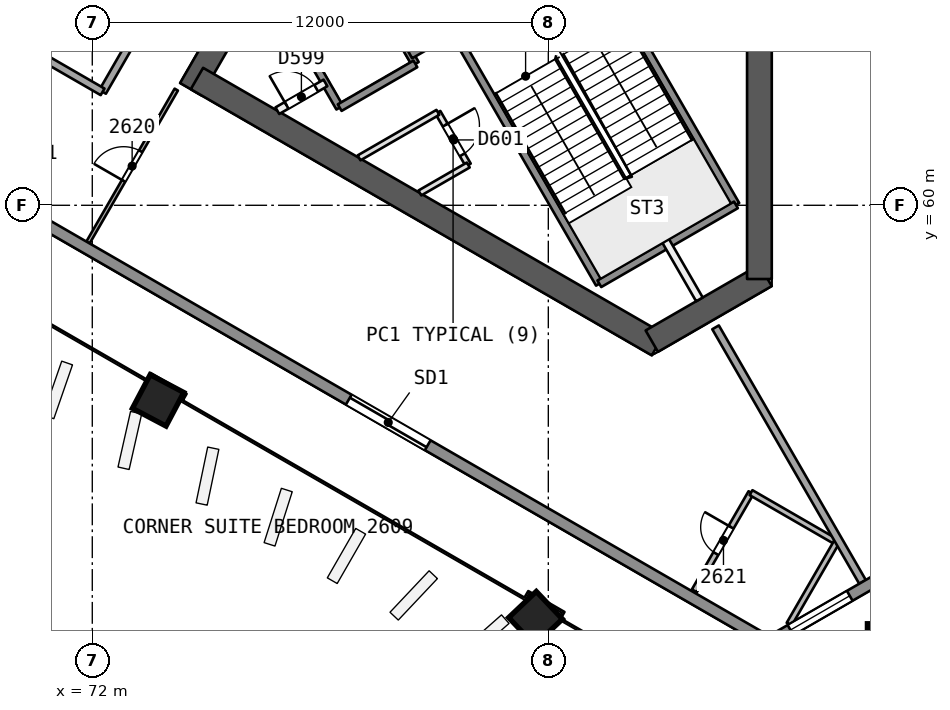
"""IFC4 building model, lengths in metres.
Left out: names, types, materials, properties, quantities, classifications, styles, units other than length and angle.
Written with IfcOpenShell. Run it as: python <this file> out.ifc"""

import sys

from ifc_helpers import new_model, si_unit, direction, frame, frame_2d, origin, origin_2d, place, context, subcontext, project, spatial, rectangle, extrude, element, fill, save


model = new_model("IFC4")
c1 = context("Model", 3, precision=1e-05, world=origin(), true_north=direction((0.0, 1.0)))
c2 = subcontext(c1, "Body", "Model", "MODEL_VIEW")
j1 = project(units=[si_unit("LENGTHUNIT", "METRE"), si_unit("PLANEANGLEUNIT", "RADIAN")], contexts=[c1])
p1 = place(None, origin())
s1 = spatial("IfcSite", under=j1, at=p1, CompositionType="ELEMENT")
p2 = place(p1, origin())
s2 = spatial("IfcBuilding", under=s1, at=p2, CompositionType="ELEMENT")
p3 = place(p2, frame((0.0, 0.0, 110.5)))
s3 = spatial("IfcBuildingStorey", under=s2, at=p3, CompositionType="ELEMENT", Elevation=110.5)
p4 = place(p3, frame((79.688, 71.881, 0.0), z_axis=(0.0, 0.0, 1.0), x_axis=(-0.49999822179, -0.866026430432, 0.0)))
e1 = element("IfcWall", 1, at=p4, inside=s3, PredefinedType="SHEAR", context=c2, shape_type="SweptSolid", body=[
    extrude(rectangle(XDim=10.192, YDim=0.65, at=frame_2d((5.096, 0.0))), origin(), (0.0, 0.0, 1.0), 3.7),
])
p5 = place(p4, frame((0.762, 0.0, 0.0)))
e2 = element("IfcOpeningElement", 2, at=p5, cuts=e1, PredefinedType="OPENING", context=c2, shape_type="SweptSolid", body=[
    extrude(rectangle(XDim=1.2, YDim=2.1, at=frame_2d((0.6, 1.05))), frame((0.0, 0.335, 0.0), z_axis=(0.0, -1.0, 0.0), x_axis=(1.0, 0.0, 0.0)), (0.0, 0.0, 1.0), 0.671),
])
p6 = place(p3, frame((74.754, 63.335, 0.0), z_axis=(0.0, 0.0, 1.0), x_axis=(0.866026250715, -0.49999853307, 0.0)))
e3 = element("IfcWall", 3, at=p6, inside=s3, PredefinedType="SHEAR", context=c2, shape_type="SweptSolid", body=[
    extrude(rectangle(XDim=14.008, YDim=0.65, at=frame_2d((7.004, 0.0))), origin(), (0.0, 0.0, 1.0), 3.7),
])
p7 = place(p3, frame((86.723, 56.425, 0.0), z_axis=(0.0, 0.0, 1.0), x_axis=(0.866031550877, 0.499989352773, 0.0)))
e4 = element("IfcWall", 4, at=p7, inside=s3, PredefinedType="SHEAR", context=c2, shape_type="SweptSolid", body=[
    extrude(rectangle(XDim=3.458, YDim=0.65, at=frame_2d((1.729, 0.0))), origin(), (0.0, 0.0, 1.0), 3.7),
])
p8 = place(p3, frame((89.555, 58.06, 0.0), z_axis=(0.0, 0.0, 1.0), x_axis=(0.0, 1.0, 0.0)))
e5 = element("IfcWall", 5, at=p8, inside=s3, PredefinedType="SHEAR", context=c2, shape_type="SweptSolid", body=[
    extrude(rectangle(XDim=14.146, YDim=0.65, at=frame_2d((7.073, 0.0))), origin(), (0.0, 0.0, 1.0), 3.7),
])
p9 = place(p3, frame((73.731, 54.839, 0.0), z_axis=(0.000857580205, 0.022758859284, 0.9997406158), x_axis=(-0.500033163106, -0.865772080668, 0.020138026985)))
e6 = element("IfcColumn", 6, at=p9, inside=s3, PredefinedType="COLUMN", context=c2, shape_type="SweptSolid", body=[
    extrude(rectangle(XDim=1.0, YDim=1.0, at=origin_2d()), origin(), (0.0, 0.0, 1.0), 3.701),
])
p10 = place(p3, frame((83.674, 49.098, 0.0), z_axis=(-0.008376454378, 0.028163354484, 0.999568237028), x_axis=(-0.500229782748, -0.865657085713, 0.020198376324)))
e7 = element("IfcColumn", 7, at=p10, inside=s3, PredefinedType="COLUMN", context=c2, shape_type="SweptSolid", body=[
    extrude(rectangle(XDim=1.0, YDim=1.0, at=origin_2d()), origin(), (0.0, 0.0, 1.0), 3.702),
])
p11 = place(p3, frame((93.617, 47.753, 0.0), z_axis=(-0.017541078386, 0.030532027415, 0.999379860649), x_axis=(0.497845433655, -0.866550650603, 0.035212130424)))
e8 = element("IfcColumn", 8, at=p11, inside=s3, PredefinedType="COLUMN", context=c2, shape_type="SweptSolid", body=[
    extrude(rectangle(XDim=2.4, YDim=2.4, at=origin_2d()), origin(), (0.0, 0.0, 1.0), 3.702),
])
p12 = place(p3, frame((88.401, 56.789, 0.0), z_axis=(0.0, 0.0, 1.0), x_axis=(0.499985685157, -0.866033668305, 0.0)))
e9 = element("IfcWall", 9, at=p12, inside=s3, PredefinedType="PARTITIONING", context=c2, shape_type="SweptSolid", body=[
    extrude(rectangle(XDim=7.734, YDim=0.2, at=frame_2d((3.867, 0.0))), origin(), (0.0, 0.0, 1.0), 3.25),
])
p13 = place(p3, frame((67.297, 61.67, 0.0), z_axis=(0.0, 0.0, 1.0), x_axis=(0.500003096163, 0.866023616206, 0.0)))
e10 = element("IfcWall", 10, at=p13, inside=s3, PredefinedType="PARTITIONING", context=c2, shape_type="SweptSolid", body=[
    extrude(rectangle(XDim=12.626, YDim=0.2, at=frame_2d((6.313, 0.0))), origin(), (0.0, 0.0, 1.0), 3.25),
])
p14 = place(p3, frame((71.887, 59.02, 0.0), z_axis=(0.0, 0.0, 1.0), x_axis=(0.499958946799, 0.866049104564, 0.0)))
e11 = element("IfcWall", 11, at=p14, inside=s3, PredefinedType="PARTITIONING", context=c2, shape_type="SweptSolid", body=[
    extrude(rectangle(XDim=4.647, YDim=0.1, at=frame_2d((2.323, 0.0))), origin(), (0.0, 0.0, 1.0), 3.25),
])
p15 = place(p14, frame((1.873, 0.0, 0.0)))
e12 = element("IfcOpeningElement", 12, at=p15, cuts=e11, PredefinedType="OPENING", context=c2, shape_type="SweptSolid", body=[
    extrude(rectangle(XDim=0.9, YDim=2.1, at=frame_2d((0.45, 1.05))), frame((0.0, 0.061, 0.0), z_axis=(0.0, -1.0, 0.0), x_axis=(1.0, 0.0, 0.0)), (0.0, 0.0, 1.0), 0.121),
])
p16 = place(p3, frame((76.771, 70.779, 0.0), z_axis=(0.0, 0.0, 1.0), x_axis=(-0.5000018851, -0.866024315419, 0.0)))
e13 = element("IfcWall", 13, at=p16, inside=s3, PredefinedType="PARTITIONING", context=c2, shape_type="SweptSolid", body=[
    extrude(rectangle(XDim=9.0, YDim=0.2, at=frame_2d((4.5, 0.0))), origin(), (0.0, 0.0, 1.0), 3.25),
])
p17 = place(p16, frame((4.05, 0.0, 0.0)))
e14 = element("IfcOpeningElement", 14, at=p17, cuts=e13, PredefinedType="OPENING", context=c2, shape_type="SweptSolid", body=[
    extrude(rectangle(XDim=0.9, YDim=2.1, at=frame_2d((0.45, 1.05))), frame((0.0, 0.11, 0.0), z_axis=(0.0, -1.0, 0.0), x_axis=(1.0, 0.0, 0.0)), (0.0, 0.0, 1.0), 0.221),
])
p18 = place(p3, frame((72.271, 62.985, 0.0), z_axis=(0.0, 0.0, 1.0), x_axis=(-0.866010750942, 0.50002537861, 0.0)))
e15 = element("IfcWall", 15, at=p18, inside=s3, PredefinedType="PARTITIONING", context=c2, shape_type="SweptSolid", body=[
    extrude(rectangle(XDim=2.0, YDim=0.2, at=frame_2d((1.0, 0.0))), origin(), (0.0, 0.0, 1.0), 3.25),
])
p19 = place(p3, frame((70.539, 63.985, 0.0), z_axis=(0.0, 0.0, 1.0), x_axis=(0.5000018851, 0.866024315419, 0.0)))
e16 = element("IfcWall", 16, at=p19, inside=s3, PredefinedType="PARTITIONING", context=c2, shape_type="SweptSolid", body=[
    extrude(rectangle(XDim=9.0, YDim=0.2, at=frame_2d((4.5, 0.0))), origin(), (0.0, 0.0, 1.0), 3.25),
])
p20 = place(p3, frame((87.843, 49.855, 0.0), z_axis=(0.0, 0.0, 1.0), x_axis=(0.49996804791, 0.866043850546, 0.0)))
e17 = element("IfcWall", 17, at=p20, inside=s3, PredefinedType="PARTITIONING", context=c2, shape_type="SweptSolid", body=[
    extrude(rectangle(XDim=2.983, YDim=0.15, at=frame_2d((1.492, 0.0))), origin(), (0.0, 0.0, 1.0), 3.25),
])
p21 = place(p20, frame((1.133, 0.0, 0.0)))
e18 = element("IfcOpeningElement", 18, at=p21, cuts=e17, PredefinedType="OPENING", context=c2, shape_type="SweptSolid", body=[
    extrude(rectangle(XDim=0.8, YDim=2.1, at=frame_2d((0.4, 1.05))), frame((0.0, 0.085, 0.0), z_axis=(0.0, -1.0, 0.0), x_axis=(1.0, 0.0, 0.0)), (0.0, 0.0, 1.0), 0.171),
])
p22 = place(p3, frame((89.334, 52.439, 0.0), z_axis=(0.0, 0.0, 1.0), x_axis=(0.866021400173, -0.500006934395, 0.0)))
e19 = element("IfcWall", 19, at=p22, inside=s3, PredefinedType="PARTITIONING", context=c2, shape_type="SweptSolid", body=[
    extrude(rectangle(XDim=2.6, YDim=0.15, at=frame_2d((1.3, 0.0))), origin(), (0.0, 0.0, 1.0), 3.25),
])
p23 = place(p3, frame((91.586, 51.139, 0.0), z_axis=(0.0, 0.0, 1.0), x_axis=(-0.500018619731, -0.866014653411, 0.0)))
e20 = element("IfcWall", 20, at=p23, inside=s3, PredefinedType="PARTITIONING", context=c2, shape_type="SweptSolid", body=[
    extrude(rectangle(XDim=2.498, YDim=0.15, at=frame_2d((1.249, 0.0))), origin(), (0.0, 0.0, 1.0), 3.25),
])
p24 = place(p3, frame((94.875, 51.424, 0.0), z_axis=(0.0, 0.0, 1.0), x_axis=(-0.866017340887, -0.500013965089, 0.0)))
e21 = element("IfcWall", 21, at=p24, inside=s3, PredefinedType="SOLIDWALL", context=c2, shape_type="SweptSolid", body=[
    extrude(rectangle(XDim=5.848, YDim=0.3, at=frame_2d((2.924, 0.0))), origin(), (0.0, 0.0, 1.0), 3.25),
])
p25 = place(p24, frame((3.398, 0.0, 0.9)))
e22 = element("IfcOpeningElement", 22, at=p25, cuts=e21, PredefinedType="OPENING", context=c2, shape_type="SweptSolid", body=[
    extrude(rectangle(XDim=1.8, YDim=1.5, at=frame_2d((0.9, 0.75))), frame((0.0, 0.161, 0.0), z_axis=(0.0, -1.0, 0.0), x_axis=(1.0, 0.0, 0.0)), (0.0, 0.0, 1.0), 0.321),
])
p26 = place(p24, frame((0.519, 0.0, 0.9)))
e23 = element("IfcOpeningElement", 23, at=p26, cuts=e21, PredefinedType="OPENING", context=c2, shape_type="SweptSolid", body=[
    extrude(rectangle(XDim=1.8, YDim=1.5, at=frame_2d((0.9, 0.75))), frame((0.0, 0.161, 0.0), z_axis=(0.0, -1.0, 0.0), x_axis=(1.0, 0.0, 0.0)), (0.0, 0.0, 1.0), 0.321),
])
p27 = place(p3, frame((89.81, 48.5, 0.0), z_axis=(0.0, 0.0, 1.0), x_axis=(-0.866025315226, 0.500000153387, 0.0)))
e24 = element("IfcWall", 24, at=p27, inside=s3, PredefinedType="SOLIDWALL", context=c2, shape_type="SweptSolid", body=[
    extrude(rectangle(XDim=57.152, YDim=0.3, at=frame_2d((28.576, 0.0))), origin(), (0.0, 0.0, 1.0), 3.25),
])
p28 = place(p27, frame((22.232, 0.0, 0.0)))
e25 = element("IfcOpeningElement", 25, at=p28, cuts=e24, PredefinedType="OPENING", context=c2, shape_type="SweptSolid", body=[
    extrude(rectangle(XDim=2.4, YDim=2.4, at=frame_2d((1.2, 1.2))), frame((0.0, 0.161, 0.0), z_axis=(0.0, -1.0, 0.0), x_axis=(1.0, 0.0, 0.0)), (0.0, 0.0, 1.0), 0.321),
])
p29 = place(p27, frame((10.373, 0.0, 0.0)))
e26 = element("IfcOpeningElement", 26, at=p29, cuts=e24, PredefinedType="OPENING", context=c2, shape_type="SweptSolid", body=[
    extrude(rectangle(XDim=2.4, YDim=2.4, at=frame_2d((1.2, 1.2))), frame((0.0, 0.161, 0.0), z_axis=(0.0, -1.0, 0.0), x_axis=(1.0, 0.0, 0.0)), (0.0, 0.0, 1.0), 0.321),
])
p30 = place(p27, frame((42.955, 0.0, 0.0)))
e27 = element("IfcOpeningElement", 27, at=p30, cuts=e24, PredefinedType="OPENING", context=c2, shape_type="SweptSolid", body=[
    extrude(rectangle(XDim=2.4, YDim=2.4, at=frame_2d((1.2, 1.2))), frame((0.0, 0.161, 0.0), z_axis=(0.0, -1.0, 0.0), x_axis=(1.0, 0.0, 0.0)), (0.0, 0.0, 1.0), 0.321),
])
p31 = place(p27, frame((27.676, 0.0, 0.9)))
e28 = element("IfcOpeningElement", 28, at=p31, cuts=e24, PredefinedType="OPENING", context=c2, shape_type="SweptSolid", body=[
    extrude(rectangle(XDim=1.8, YDim=1.5, at=frame_2d((0.9, 0.75))), frame((0.0, 0.161, 0.0), z_axis=(0.0, -1.0, 0.0), x_axis=(1.0, 0.0, 0.0)), (0.0, 0.0, 1.0), 0.321),
])
p32 = place(p3, frame((77.135, 64.952, 0.0), z_axis=(0.0, 0.0, 1.0), x_axis=(0.499996545922, -0.866027397988, 0.0)))
e29 = element("IfcWall", 29, at=p32, inside=s3, PredefinedType="SOLIDWALL", context=c2, shape_type="SweptSolid", body=[
    extrude(rectangle(XDim=2.75, YDim=0.2, at=frame_2d((1.375, 0.0))), origin(), (0.0, 0.0, 1.0), 3.25),
])
p33 = place(p3, frame((81.094, 62.445, 0.0), z_axis=(0.0, 0.0, 1.0), x_axis=(0.499880961361, -0.866094119867, 0.0)))
e30 = element("IfcWall", 30, at=p33, inside=s3, PredefinedType="PARTITIONING", context=c2, shape_type="SweptSolid", body=[
    extrude(rectangle(XDim=1.6, YDim=0.15, at=frame_2d((0.8, 0.0))), origin(), (0.0, 0.0, 1.0), 3.25),
])
p34 = place(p33, frame((0.387, 0.0, 0.0)))
e31 = element("IfcOpeningElement", 31, at=p34, cuts=e30, PredefinedType="OPENING", context=c2, shape_type="SweptSolid", body=[
    extrude(rectangle(XDim=0.9, YDim=2.1, at=frame_2d((0.45, 1.05))), frame((0.0, 0.085, 0.0), z_axis=(0.0, -1.0, 0.0), x_axis=(1.0, 0.0, 0.0)), (0.0, 0.0, 1.0), 0.171),
])
p35 = place(p3, frame((79.127, 66.102, 0.0), z_axis=(0.0, 0.0, 1.0), x_axis=(0.499996545922, -0.866027397988, 0.0)))
e32 = element("IfcWall", 32, at=p35, inside=s3, PredefinedType="SOLIDWALL", context=c2, shape_type="SweptSolid", body=[
    extrude(rectangle(XDim=2.75, YDim=0.2, at=frame_2d((1.375, 0.0))), origin(), (0.0, 0.0, 1.0), 3.25),
])
p36 = place(p3, frame((81.493, 64.604, 0.0), z_axis=(0.0, 0.0, 1.0), x_axis=(0.500006057782, -0.866021906294, 0.0)))
e33 = element("IfcWall", 33, at=p36, inside=s3, PredefinedType="SOLIDWALL", context=c2, shape_type="SweptSolid", body=[
    extrude(rectangle(XDim=7.7, YDim=0.2, at=frame_2d((3.85, 0.0))), origin(), (0.0, 0.0, 1.0), 3.25),
])
p37 = place(p3, frame((87.09, 59.06, 0.0), z_axis=(0.0, 0.0, 1.0), x_axis=(0.499944938281, -0.866057191349, 0.0)))
e34 = element("IfcWall", 34, at=p37, inside=s3, PredefinedType="PARTITIONING", context=c2, shape_type="SweptSolid", body=[
    extrude(rectangle(XDim=1.773, YDim=0.2, at=frame_2d((0.887, 0.0))), origin(), (0.0, 0.0, 1.0), 3.25),
])
p38 = place(p3, frame((85.087, 66.679, 0.0), z_axis=(0.0, 0.0, 1.0), x_axis=(0.500019787375, -0.866013979237, 0.0)))
e35 = element("IfcWall", 35, at=p38, inside=s3, PredefinedType="SOLIDWALL", context=c2, shape_type="SweptSolid", body=[
    extrude(rectangle(XDim=7.7, YDim=0.2, at=frame_2d((3.85, 0.0))), origin(), (0.0, 0.0, 1.0), 3.25),
])
p39 = place(p38, frame((0.55, 0.0, 0.0)))
e36 = element("IfcOpeningElement", 36, at=p39, cuts=e35, PredefinedType="OPENING", context=c2, shape_type="SweptSolid", body=[
    extrude(rectangle(XDim=1.1, YDim=2.1, at=frame_2d((0.55, 1.05))), frame((0.0, 0.11, 0.0), z_axis=(0.0, -1.0, 0.0), x_axis=(1.0, 0.0, 0.0)), (0.0, 0.0, 1.0), 0.221),
])
p40 = place(p3, frame((76.87, 62.489, 0.0), z_axis=(0.0, 0.0, 1.0), x_axis=(0.866054810376, 0.49994906283, 0.0)))
e37 = element("IfcWall", 37, at=p40, inside=s3, PredefinedType="PARTITIONING", context=c2, shape_type="SweptSolid", body=[
    extrude(rectangle(XDim=1.461, YDim=0.2, at=frame_2d((0.73, 0.0))), origin(), (0.0, 0.0, 1.0), 3.25),
])
p41 = place(p40, frame((0.281, 0.0, 0.0)))
e38 = element("IfcOpeningElement", 38, at=p41, cuts=e37, PredefinedType="OPENING", context=c2, shape_type="SweptSolid", body=[
    extrude(rectangle(XDim=0.9, YDim=2.1, at=frame_2d((0.45, 1.05))), frame((0.0, 0.11, 0.0), z_axis=(0.0, -1.0, 0.0), x_axis=(1.0, 0.0, 0.0)), (0.0, 0.0, 1.0), 0.221),
])
p42 = place(p3, frame((80.367, 63.954, 0.0), z_axis=(0.0, 0.0, 1.0), x_axis=(0.866026575979, 0.499997969693, 0.0)))
e39 = element("IfcWall", 39, at=p42, inside=s3, PredefinedType="SOLIDWALL", context=c2, shape_type="SweptSolid", body=[
    extrude(rectangle(XDim=6.75, YDim=0.2, at=frame_2d((3.375, 0.0))), origin(), (0.0, 0.0, 1.0), 3.25),
])
p43 = place(p3, frame((78.51, 62.57, 0.0), z_axis=(0.0, 0.0, 1.0), x_axis=(0.866053019151, 0.499952165731, 0.0)))
e40 = element("IfcWall", 40, at=p43, inside=s3, PredefinedType="SOLIDWALL", context=c2, shape_type="SweptSolid", body=[
    extrude(rectangle(XDim=2.3, YDim=0.2, at=frame_2d((1.15, 0.0))), origin(), (0.0, 0.0, 1.0), 3.25),
])
p44 = place(p3, frame((79.02, 61.248, 0.0), z_axis=(0.0, 0.0, 1.0), x_axis=(0.866051471819, 0.499954846121, 0.0)))
e41 = element("IfcWall", 41, at=p44, inside=s3, PredefinedType="PARTITIONING", context=c2, shape_type="SweptSolid", body=[
    extrude(rectangle(XDim=2.395, YDim=0.15, at=frame_2d((1.197, 0.0))), origin(), (0.0, 0.0, 1.0), 3.25),
])
p45 = place(p3, frame((80.62, 60.324, 0.0), z_axis=(0.0, 0.0, 1.0), x_axis=(0.866069507536, 0.49992360228, 0.0)))
e42 = element("IfcWall", 42, at=p45, inside=s3, PredefinedType="PARTITIONING", context=c2, shape_type="SweptSolid", body=[
    extrude(rectangle(XDim=1.471, YDim=0.15, at=frame_2d((0.735, 0.0))), origin(), (0.0, 0.0, 1.0), 3.25),
])
p46 = place(p3, frame((85.343, 57.935, 0.0), z_axis=(0.0, 0.0, 1.0), x_axis=(0.866004344652, 0.500036473714, 0.0)))
e43 = element("IfcWall", 43, at=p46, inside=s3, PredefinedType="SOLIDWALL", context=c2, shape_type="SweptSolid", body=[
    extrude(rectangle(XDim=4.15, YDim=0.2, at=frame_2d((2.075, 0.0))), origin(), (0.0, 0.0, 1.0), 3.25),
])
p47 = place(p15, origin())
e44 = element("IfcDoor", 44, at=p47, inside=s3, OperationType="SINGLE_SWING_LEFT", PredefinedType="NOTDEFINED", context=c2, shape_type="SweptSolid", body=[
    extrude(rectangle(XDim=0.9, YDim=2.1, at=frame_2d((0.45, 1.05))), frame((0.0, 0.025, 0.0), z_axis=(0.0, -1.0, 0.0), x_axis=(1.0, 0.0, 0.0)), (0.0, 0.0, 1.0), 0.05),
])
fill(e12, e44)
p48 = place(p21, origin())
e45 = element("IfcDoor", 45, at=p48, inside=s3, OperationType="SINGLE_SWING_RIGHT", PredefinedType="NOTDEFINED", context=c2, shape_type="SweptSolid", body=[
    extrude(rectangle(XDim=0.8, YDim=2.1, at=frame_2d((0.4, 1.05))), frame((0.0, 0.025, 0.0), z_axis=(0.0, -1.0, 0.0), x_axis=(1.0, 0.0, 0.0)), (0.0, 0.0, 1.0), 0.05),
])
fill(e18, e45)
p49 = place(p25, origin())
e46 = element("IfcWindow", 46, at=p49, inside=s3, PartitioningType="SINGLE_PANEL", PredefinedType="WINDOW", context=c2, shape_type="SweptSolid", body=[
    extrude(rectangle(XDim=1.8, YDim=1.5, at=frame_2d((0.9, 0.75))), frame((0.0, 0.03, 0.0), z_axis=(0.0, -1.0, 0.0), x_axis=(1.0, 0.0, 0.0)), (0.0, 0.0, 1.0), 0.06),
])
fill(e22, e46)
p50 = place(p29, origin())
e47 = element("IfcDoor", 47, at=p50, inside=s3, OperationType="SLIDING_TO_RIGHT", PredefinedType="NOTDEFINED", context=c2, shape_type="SweptSolid", body=[
    extrude(rectangle(XDim=2.4, YDim=2.4, at=frame_2d((1.2, 1.2))), frame((0.0, 0.025, 0.0), z_axis=(0.0, -1.0, 0.0), x_axis=(1.0, 0.0, 0.0)), (0.0, 0.0, 1.0), 0.05),
])
fill(e26, e47)
p51 = place(p41, origin())
e48 = element("IfcDoor", 48, at=p51, inside=s3, OperationType="SINGLE_SWING_LEFT", PredefinedType="NOTDEFINED", context=c2, shape_type="SweptSolid", body=[
    extrude(rectangle(XDim=0.9, YDim=2.1, at=frame_2d((0.45, 1.05))), frame((0.0, 0.025, 0.0), z_axis=(0.0, -1.0, 0.0), x_axis=(1.0, 0.0, 0.0)), (0.0, 0.0, 1.0), 0.05),
])
fill(e38, e48)
p52 = place(p34, origin())
e49 = element("IfcDoor", 49, at=p52, inside=s3, OperationType="SINGLE_SWING_LEFT", PredefinedType="NOTDEFINED", context=c2, shape_type="SweptSolid", body=[
    extrude(rectangle(XDim=0.9, YDim=2.1, at=frame_2d((0.45, 1.05))), frame((0.0, 0.025, 0.0), z_axis=(0.0, -1.0, 0.0), x_axis=(1.0, 0.0, 0.0)), (0.0, 0.0, 1.0), 0.05),
])
fill(e31, e49)
save(model, sys.argv[1])
